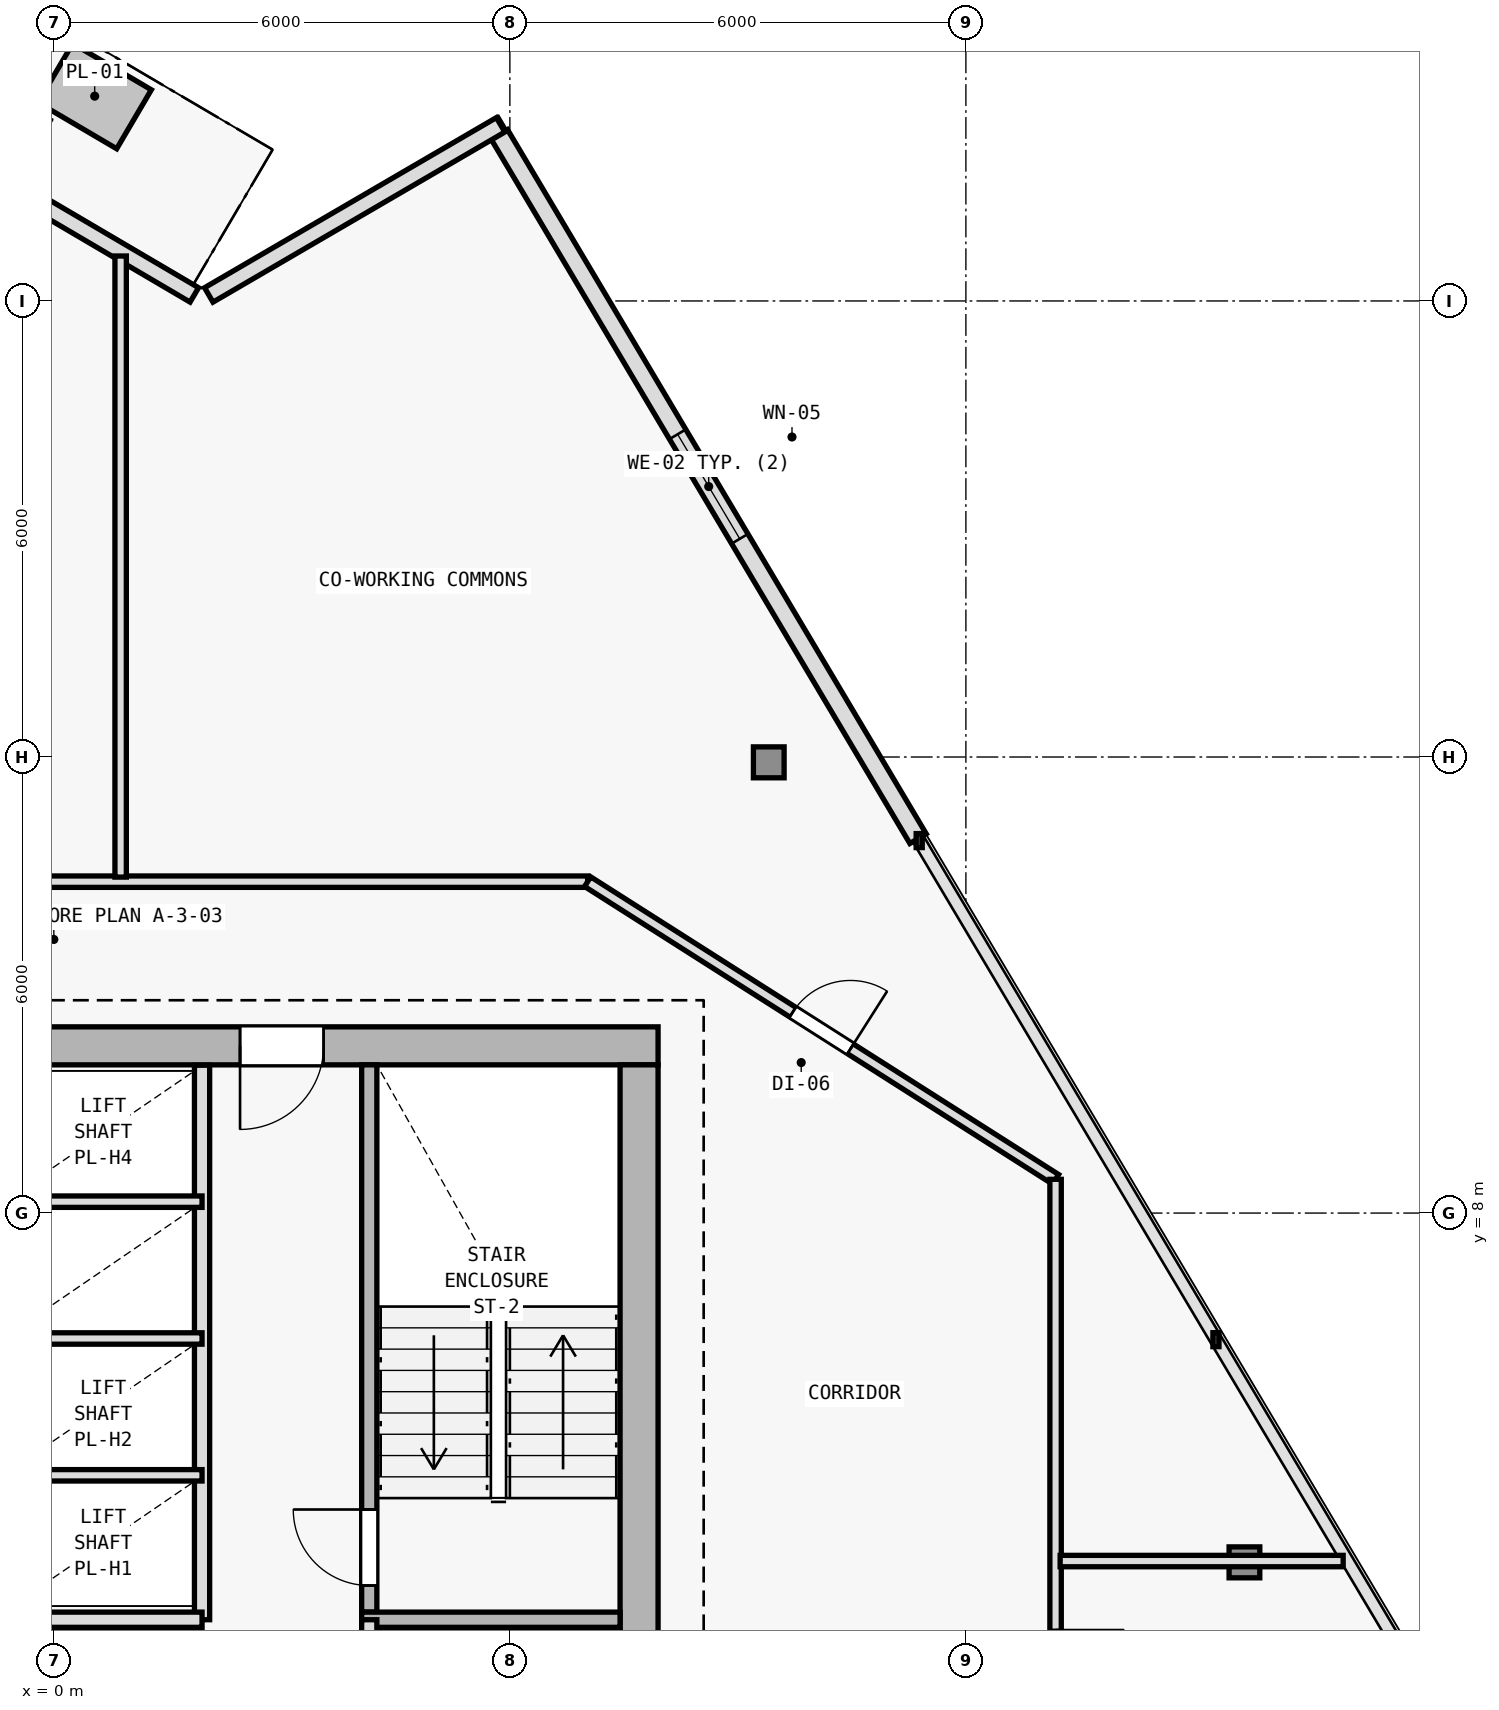
"""IFC4 building model, lengths in metres.
Left out: names, types, materials, properties, quantities, classifications, styles, units other than length and angle.
Written with IfcOpenShell. Run it as: python <this file> out.ifc"""

import sys

from ifc_helpers import new_model, si_unit, direction, frame, frame_2d, origin, origin_2d, place, context, subcontext, project, spatial, rectangle, i_section, extrude, element, fill, save


model = new_model("IFC4")
c1 = context("Model", 3, precision=1e-05, world=origin(), true_north=direction((0.0, 1.0)))
c2 = subcontext(c1, "Body", "Model", "MODEL_VIEW")
j1 = project(units=[si_unit("LENGTHUNIT", "METRE"), si_unit("PLANEANGLEUNIT", "RADIAN")], contexts=[c1])
p1 = place(None, origin())
s1 = spatial("IfcSite", under=j1, at=p1, CompositionType="ELEMENT")
p2 = place(p1, origin())
s2 = spatial("IfcBuilding", under=s1, at=p2, CompositionType="ELEMENT")
p3 = place(p2, frame((0.0, 0.0, 156.6)))
s3 = spatial("IfcBuildingStorey", under=s2, at=p3, CompositionType="ELEMENT", Elevation=156.6)
p4 = place(p3, frame((7.7, 10.2, 0.0), z_axis=(0.0, 0.0, 1.0), x_axis=(1.0, 0.0, 0.0)))
e1 = element("IfcColumn", 1, at=p4, inside=s3, PredefinedType="COLUMN", context=c2, shape_type="SweptSolid", body=[
    extrude(i_section(OverallWidth=0.404, OverallDepth=0.407, WebThickness=0.017, FlangeThickness=0.028, FilletRadius=0.015, at=origin_2d()), origin(), (0.0, 0.0, 1.0), 3.6),
])
p5 = place(p3, frame((15.665, 3.405, 0.005), z_axis=(-0.018906041, 0.009521027842, 0.999775930718), x_axis=(-0.449781931574, -0.893138406984, 0.0)))
e2 = element("IfcColumn", 2, at=p5, inside=s3, PredefinedType="COLUMN", context=c2, shape_type="SweptSolid", body=[
    extrude(i_section(OverallWidth=0.404, OverallDepth=0.407, WebThickness=0.017, FlangeThickness=0.028, FilletRadius=0.015, at=origin_2d()), origin(), (0.0, 0.0, 1.0), 3.59),
])
p6 = place(p3, frame((9.406, 13.93, 0.005), z_axis=(-0.011699046613, -0.002516655376, 0.999928396814), x_axis=(0.210305364179, -0.977635746993, 0.0)))
e3 = element("IfcColumn", 3, at=p6, inside=s3, PredefinedType="COLUMN", context=c2, shape_type="SweptSolid", body=[
    extrude(i_section(OverallWidth=0.404, OverallDepth=0.407, WebThickness=0.017, FlangeThickness=0.028, FilletRadius=0.015, at=origin_2d()), origin(), (0.0, 0.0, 1.0), 3.589),
])
p7 = place(p3, frame((5.862, 22.19, 0.0), z_axis=(0.0, 0.0, 1.0), x_axis=(0.511083986456, -0.859530778267, 0.0)))
e4 = element("IfcWall", 4, at=p7, inside=s3, PredefinedType="SOLIDWALL", context=c2, shape_type="SweptSolid", body=[
    extrude(rectangle(XDim=10.778, YDim=0.25, at=frame_2d((5.389, 0.0))), origin(), (0.0, 0.0, 1.0), 3.35),
])
p8 = place(p7, frame((4.589, 0.0, 0.62)))
e5 = element("IfcOpeningElement", 5, at=p8, cuts=e4, PredefinedType="OPENING", context=c2, shape_type="SweptSolid", body=[
    extrude(rectangle(XDim=1.6, YDim=2.1, at=frame_2d((0.8, 1.05))), frame((0.0, 0.135, 0.0), z_axis=(0.0, -1.0, 0.0), x_axis=(1.0, 0.0, 0.0)), (0.0, 0.0, 1.0), 0.27),
])
p9 = place(p3, frame((2.039, 20.079, 0.0), z_axis=(0.0, 0.0, 1.0), x_axis=(0.86398603623, 0.503515768571, 0.0)))
e6 = element("IfcWall", 6, at=p9, inside=s3, PredefinedType="SOLIDWALL", context=c2, shape_type="SweptSolid", body=[
    extrude(rectangle(XDim=4.444, YDim=0.22, at=frame_2d((2.222, 0.0))), origin(), (0.0, 0.0, 1.0), 3.35),
])
p10 = place(p3, frame((-2.385, 22.567, 0.0), z_axis=(0.0, 0.0, 1.0), x_axis=(0.8621258938, -0.506694131839, 0.0)))
e7 = element("IfcWall", 7, at=p10, inside=s3, PredefinedType="SOLIDWALL", context=c2, shape_type="SweptSolid", body=[
    extrude(rectangle(XDim=4.91, YDim=0.22, at=frame_2d((2.455, 0.0))), origin(), (0.0, 0.0, 1.0), 3.35),
])
p11 = place(p10, frame((1.08, 0.0, 0.0)))
e8 = element("IfcOpeningElement", 8, at=p11, cuts=e7, PredefinedType="OPENING", context=c2, shape_type="SweptSolid", body=[
    extrude(rectangle(XDim=1.05, YDim=2.15, at=frame_2d((0.525, 1.075))), frame((0.0, 0.12, 0.0), z_axis=(0.0, -1.0, 0.0), x_axis=(1.0, 0.0, 0.0)), (0.0, 0.0, 1.0), 0.24),
])
p12 = place(p3, frame((7.95, 10.2, 0.0), z_axis=(0.0, 0.0, 1.0), x_axis=(-1.0, 0.0, 0.0)))
e9 = element("IfcWall", 9, at=p12, inside=s3, PredefinedType="SHEAR", context=c2, shape_type="SweptSolid", body=[
    extrude(rectangle(XDim=15.9, YDim=0.5, at=frame_2d((7.95, 0.0))), origin(), (0.0, 0.0, 1.0), 3.35),
])
p13 = place(p12, frame((4.4, 0.0, 0.0)))
e10 = element("IfcOpeningElement", 10, at=p13, cuts=e9, PredefinedType="OPENING", context=c2, shape_type="SweptSolid", body=[
    extrude(rectangle(XDim=1.1, YDim=2.15, at=frame_2d((0.55, 1.075))), frame((0.0, 0.26, 0.0), z_axis=(0.0, -1.0, 0.0), x_axis=(1.0, 0.0, 0.0)), (0.0, 0.0, 1.0), 0.52),
])
p14 = place(p3, frame((7.7, 9.95, 0.0), z_axis=(0.0, 0.0, 1.0), x_axis=(0.0, -1.0, 0.0)))
e11 = element("IfcWall", 11, at=p14, inside=s3, PredefinedType="SHEAR", context=c2, shape_type="SweptSolid", body=[
    extrude(rectangle(XDim=19.1, YDim=0.5, at=frame_2d((9.55, 0.0))), origin(), (0.0, 0.0, 1.0), 3.35),
])
p15 = place(p3, frame((4.15, 2.75, 0.0), z_axis=(0.0, 0.0, 1.0), x_axis=(0.0, 1.0, 0.0)))
e12 = element("IfcWall", 12, at=p15, inside=s3, PredefinedType="SOLIDWALL", context=c2, shape_type="SweptSolid", body=[
    extrude(rectangle(XDim=7.2, YDim=0.2, at=frame_2d((3.6, 0.0))), origin(), (0.0, 0.0, 1.0), 3.35),
])
p16 = place(p15, frame((0.35, 0.0, 0.0)))
e13 = element("IfcOpeningElement", 13, at=p16, cuts=e12, PredefinedType="OPENING", context=c2, shape_type="SweptSolid", body=[
    extrude(rectangle(XDim=1.0, YDim=2.15, at=frame_2d((0.5, 1.075))), frame((0.0, 0.11, 0.0), z_axis=(0.0, -1.0, 0.0), x_axis=(1.0, 0.0, 0.0)), (0.0, 0.0, 1.0), 0.22),
])
p17 = place(p3, frame((4.05, 2.65, 0.0), z_axis=(0.0, 0.0, 1.0), x_axis=(1.0, 0.0, 0.0)))
e14 = element("IfcWall", 14, at=p17, inside=s3, PredefinedType="SOLIDWALL", context=c2, shape_type="SweptSolid", body=[
    extrude(rectangle(XDim=3.4, YDim=0.2, at=frame_2d((1.7, 0.0))), origin(), (0.0, 0.0, 1.0), 3.35),
])
p18 = place(p3, frame((4.15, -6.05, 0.0), z_axis=(0.0, 0.0, 1.0), x_axis=(0.0, 1.0, 0.0)))
e15 = element("IfcWall", 15, at=p18, inside=s3, PredefinedType="SOLIDWALL", context=c2, shape_type="SweptSolid", body=[
    extrude(rectangle(XDim=8.7, YDim=0.2, at=frame_2d((4.35, 0.0))), origin(), (0.0, 0.0, 1.0), 3.35),
])
p19 = place(p18, frame((3.6, 0.0, 0.0)))
e16 = element("IfcOpeningElement", 16, at=p19, cuts=e15, PredefinedType="OPENING", context=c2, shape_type="SweptSolid", body=[
    extrude(rectangle(XDim=0.95, YDim=2.1, at=frame_2d((0.475, 1.05))), frame((0.0, 0.11, 0.0), z_axis=(0.0, -1.0, 0.0), x_axis=(1.0, 0.0, 0.0)), (0.0, 0.0, 1.0), 0.22),
])
p20 = place(p3, frame((1.95, 2.65, 0.0), z_axis=(0.0, 0.0, 1.0), x_axis=(0.0, 1.0, 0.0)))
e17 = element("IfcWall", 17, at=p20, inside=s3, PredefinedType="SOLIDWALL", context=c2, shape_type="SweptSolid", body=[
    extrude(rectangle(XDim=7.295, YDim=0.2, at=frame_2d((3.647, 0.0))), origin(), (0.0, 0.0, 1.0), 3.35),
])
p21 = place(p3, frame((-0.95, 2.65, 0.0), z_axis=(0.0, 0.0, 1.0), x_axis=(1.0, 0.0, 0.0)))
e18 = element("IfcWall", 18, at=p21, inside=s3, PredefinedType="SOLIDWALL", context=c2, shape_type="SweptSolid", body=[
    extrude(rectangle(XDim=2.9, YDim=0.2, at=frame_2d((1.45, 0.0))), origin(), (0.0, 0.0, 1.0), 3.35),
])
for number, where, z_axis, x_axis in (
    (19, (-0.75, 4.55, 0.0), (0.0, 0.0, 1.0), (1.0, 0.0, 0.0)),
    (20, (-0.75, 6.35, 0.0), (0.0, 0.0, 1.0), (1.0, 0.0, 0.0)),
    (21, (-0.75, 8.15, 0.0), (0.0, 0.0, 1.0), (1.0, 0.0, 0.0)),
):
    element("IfcWall", number, at=place(p3, frame(where, z_axis=z_axis, x_axis=x_axis)), inside=s3, PredefinedType="PARTITIONING", context=c2, shape_type="SweptSolid", body=[
        extrude(rectangle(XDim=2.7, YDim=0.15, at=frame_2d((1.35, 0.0))), origin(), (0.0, 0.0, 1.0), 3.35),
    ])
p22 = place(p3, frame((-7.041, 12.36, 0.0), z_axis=(0.0, 0.0, 1.0), x_axis=(1.0, 0.0, 0.0)))
e22 = element("IfcWall", 22, at=p22, inside=s3, PredefinedType="PARTITIONING", context=c2, shape_type="SweptSolid", body=[
    extrude(rectangle(XDim=14.064, YDim=0.15, at=frame_2d((7.032, 0.0))), origin(), (0.0, 0.0, 1.0), 2.965),
])
p23 = place(p22, frame((3.599, 0.0, 0.0)))
e23 = element("IfcOpeningElement", 23, at=p23, cuts=e22, PredefinedType="OPENING", context=c2, shape_type="SweptSolid", body=[
    extrude(rectangle(XDim=0.9, YDim=2.1, at=frame_2d((0.45, 1.05))), frame((0.0, 0.085, 0.0), z_axis=(0.0, -1.0, 0.0), x_axis=(1.0, 0.0, 0.0)), (0.0, 0.0, 1.0), 0.17),
])
p24 = place(p3, frame((7.023, 12.36, 0.0), z_axis=(0.0, 0.0, 1.0), x_axis=(0.84376480085, -0.536713108511, 0.0)))
e24 = element("IfcWall", 24, at=p24, inside=s3, PredefinedType="PARTITIONING", context=c2, shape_type="SweptSolid", body=[
    extrude(rectangle(XDim=7.297, YDim=0.15, at=frame_2d((3.648, 0.0))), origin(), (0.0, 0.0, 1.0), 2.875),
])
p25 = place(p24, frame((3.198, 0.0, 0.0)))
e25 = element("IfcOpeningElement", 25, at=p25, cuts=e24, PredefinedType="OPENING", context=c2, shape_type="SweptSolid", body=[
    extrude(rectangle(XDim=0.9, YDim=2.1, at=frame_2d((0.45, 1.05))), frame((0.0, 0.085, 0.0), z_axis=(0.0, -1.0, 0.0), x_axis=(1.0, 0.0, 0.0)), (0.0, 0.0, 1.0), 0.17),
])
p26 = place(p3, frame((13.18, 8.444, 0.0), z_axis=(0.0, 0.0, 1.0), x_axis=(0.0, -1.0, 0.0)))
e26 = element("IfcWall", 26, at=p26, inside=s3, PredefinedType="PARTITIONING", context=c2, shape_type="SweptSolid", body=[
    extrude(rectangle(XDim=20.004, YDim=0.15, at=frame_2d((10.002, 0.0))), origin(), (0.0, 0.0, 1.0), 2.775),
])
p27 = place(p26, frame((17.226, 0.0, 0.0)))
e27 = element("IfcOpeningElement", 27, at=p27, cuts=e26, PredefinedType="OPENING", context=c2, shape_type="SweptSolid", body=[
    extrude(rectangle(XDim=0.9, YDim=2.1, at=frame_2d((0.45, 1.05))), frame((0.0, 0.085, 0.0), z_axis=(0.0, -1.0, 0.0), x_axis=(1.0, 0.0, 0.0)), (0.0, 0.0, 1.0), 0.17),
])
p28 = place(p26, frame((13.587, 0.0, 0.0)))
e28 = element("IfcOpeningElement", 28, at=p28, cuts=e26, PredefinedType="OPENING", context=c2, shape_type="SweptSolid", body=[
    extrude(rectangle(XDim=0.9, YDim=2.1, at=frame_2d((0.45, 1.05))), frame((0.0, 0.085, 0.0), z_axis=(0.0, -1.0, 0.0), x_axis=(1.0, 0.0, 0.0)), (0.0, 0.0, 1.0), 0.17),
])
p29 = place(p26, frame((10.844, 0.0, 0.0)))
e29 = element("IfcOpeningElement", 29, at=p29, cuts=e26, PredefinedType="OPENING", context=c2, shape_type="SweptSolid", body=[
    extrude(rectangle(XDim=0.9, YDim=2.1, at=frame_2d((0.45, 1.05))), frame((0.0, 0.085, 0.0), z_axis=(0.0, -1.0, 0.0), x_axis=(1.0, 0.0, 0.0)), (0.0, 0.0, 1.0), 0.17),
])
p30 = place(p26, frame((8.439, 0.0, 0.0)))
e30 = element("IfcOpeningElement", 30, at=p30, cuts=e26, PredefinedType="OPENING", context=c2, shape_type="SweptSolid", body=[
    extrude(rectangle(XDim=0.9, YDim=2.1, at=frame_2d((0.45, 1.05))), frame((0.0, 0.085, 0.0), z_axis=(0.0, -1.0, 0.0), x_axis=(1.0, 0.0, 0.0)), (0.0, 0.0, 1.0), 0.17),
])
p31 = place(p26, frame((5.93, 0.0, 0.0)))
e31 = element("IfcOpeningElement", 31, at=p31, cuts=e26, PredefinedType="OPENING", context=c2, shape_type="SweptSolid", body=[
    extrude(rectangle(XDim=0.9, YDim=2.1, at=frame_2d((0.45, 1.05))), frame((0.0, 0.085, 0.0), z_axis=(0.0, -1.0, 0.0), x_axis=(1.0, 0.0, 0.0)), (0.0, 0.0, 1.0), 0.17),
])
p32 = place(p3, frame((13.24, 3.422, 0.0), z_axis=(0.0, 0.0, 1.0), x_axis=(1.0, 0.0, 0.0)))
e32 = element("IfcWall", 32, at=p32, inside=s3, PredefinedType="PARTITIONING", context=c2, shape_type="SweptSolid", body=[
    extrude(rectangle(XDim=3.724, YDim=0.15, at=frame_2d((1.862, 0.0))), origin(), (0.0, 0.0, 1.0), 2.885),
])
p33 = place(p3, frame((0.879, 12.42, 0.0), z_axis=(0.0, 0.0, 1.0), x_axis=(0.0, 1.0, 0.0)))
e33 = element("IfcWall", 33, at=p33, inside=s3, PredefinedType="PARTITIONING", context=c2, shape_type="SweptSolid", body=[
    extrude(rectangle(XDim=8.171, YDim=0.15, at=frame_2d((4.086, 0.0))), origin(), (0.0, 0.0, 1.0), 2.885),
])
p34 = place(p8, origin())
e34 = element("IfcWindow", 34, at=p34, inside=s3, PartitioningType="SINGLE_PANEL", PredefinedType="WINDOW", context=c2, shape_type="SweptSolid", body=[
    extrude(rectangle(XDim=1.6, YDim=2.1, at=frame_2d((0.8, 1.05))), frame((0.0, 0.03, 0.0), z_axis=(0.0, -1.0, 0.0), x_axis=(1.0, 0.0, 0.0)), (0.0, 0.0, 1.0), 0.06),
])
fill(e5, e34)
p35 = place(p13, origin())
e35 = element("IfcDoor", 35, at=p35, inside=s3, OperationType="SINGLE_SWING_RIGHT", PredefinedType="DOOR", context=c2, shape_type="SweptSolid", body=[
    extrude(rectangle(XDim=1.1, YDim=2.15, at=frame_2d((0.55, 1.075))), frame((0.0, 0.025, 0.0), z_axis=(0.0, -1.0, 0.0), x_axis=(1.0, 0.0, 0.0)), (0.0, 0.0, 1.0), 0.05),
])
fill(e10, e35)
p36 = place(p16, origin())
e36 = element("IfcDoor", 36, at=p36, inside=s3, OperationType="SINGLE_SWING_RIGHT", PredefinedType="DOOR", context=c2, shape_type="SweptSolid", body=[
    extrude(rectangle(XDim=1.0, YDim=2.15, at=frame_2d((0.5, 1.075))), frame((0.0, 0.025, 0.0), z_axis=(0.0, -1.0, 0.0), x_axis=(1.0, 0.0, 0.0)), (0.0, 0.0, 1.0), 0.05),
])
fill(e13, e36)
p37 = place(p25, origin())
e37 = element("IfcDoor", 37, at=p37, inside=s3, OperationType="SINGLE_SWING_RIGHT", PredefinedType="DOOR", context=c2, shape_type="SweptSolid", body=[
    extrude(rectangle(XDim=0.9, YDim=2.1, at=frame_2d((0.45, 1.05))), frame((0.0, 0.025, 0.0), z_axis=(0.0, -1.0, 0.0), x_axis=(1.0, 0.0, 0.0)), (0.0, 0.0, 1.0), 0.05),
])
fill(e25, e37)
save(model, sys.argv[1])
